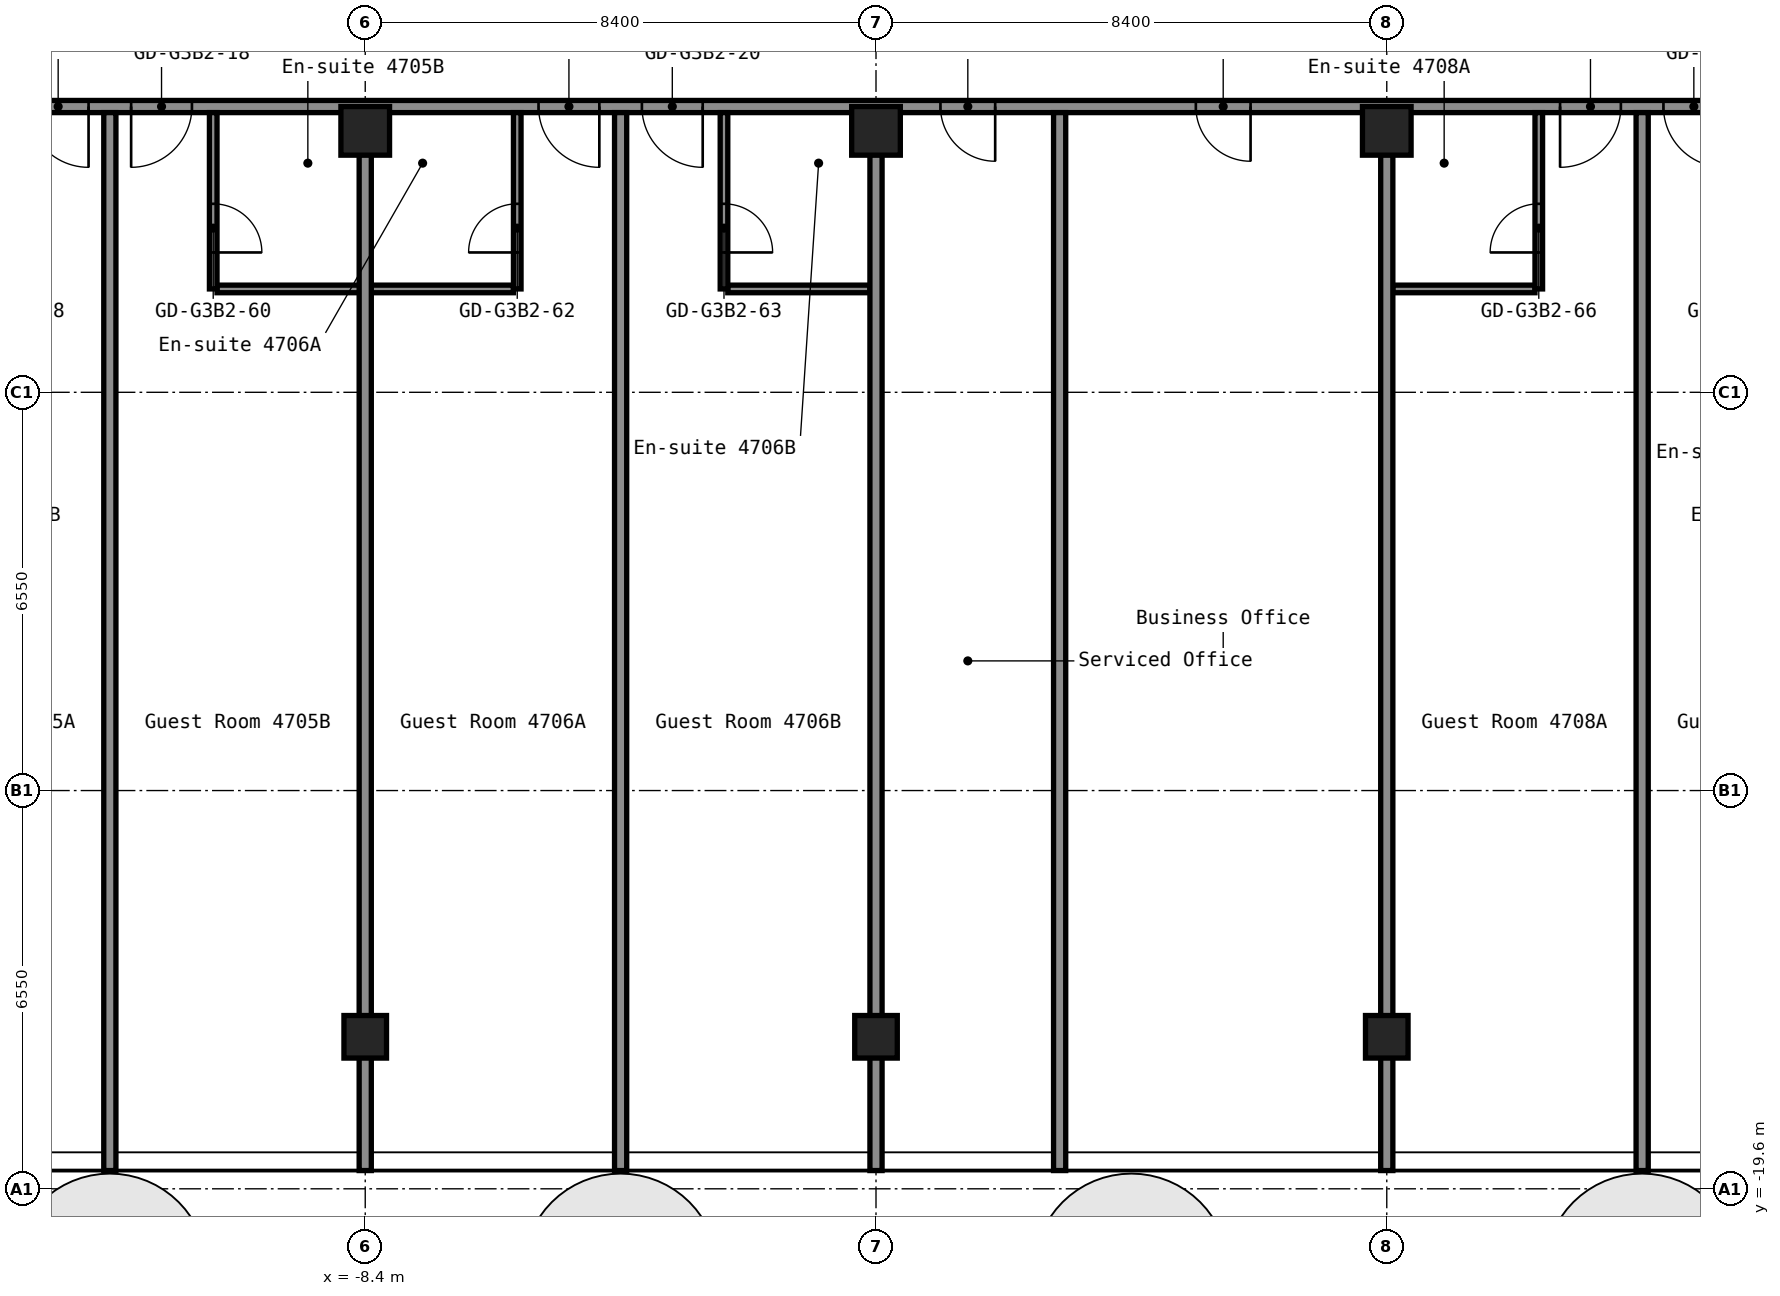
"""IFC4 building model, lengths in metres.
Left out: names, types, materials, properties, quantities, classifications, styles, units other than length and angle.
Written with IfcOpenShell. Run it as: python <this file> out.ifc"""

import sys

from ifc_helpers import new_model, si_unit, direction, frame, frame_2d, origin, origin_2d, place, context, subcontext, project, spatial, rectangle, hollow_rectangle, extrude, element, fill, save


model = new_model("IFC4")
c1 = context("Model", 3, precision=1e-05, world=origin(), true_north=direction((0.0, 1.0)))
c2 = subcontext(c1, "Body", "Model", "MODEL_VIEW")
j1 = project(units=[si_unit("LENGTHUNIT", "METRE"), si_unit("PLANEANGLEUNIT", "RADIAN")], contexts=[c1])
p1 = place(None, origin())
s1 = spatial("IfcSite", under=j1, at=p1, CompositionType="ELEMENT")
p2 = place(p1, origin())
s2 = spatial("IfcBuilding", under=s1, at=p2, CompositionType="ELEMENT")
p3 = place(p2, frame((0.0, 0.0, 166.2)))
s3 = spatial("IfcBuildingStorey", under=s2, at=p3, CompositionType="ELEMENT", Elevation=166.2)
p4 = place(p3, frame((-8.4, -17.1, 0.0), z_axis=(0.0, 0.0, 1.0), x_axis=(1.0, 0.0, 0.0)))
e1 = element("IfcColumn", 1, at=p4, inside=s3, PredefinedType="COLUMN", context=c2, shape_type="SweptSolid", body=[
    extrude(hollow_rectangle(XDim=0.7, YDim=0.7, WallThickness=0.028, at=origin_2d()), origin(), (0.0, 0.0, 1.0), 2.75),
])
p5 = place(p3, frame((-8.4, -2.2, 0.0), z_axis=(0.0, 0.0, 1.0), x_axis=(1.0, 0.0, 0.0)))
e2 = element("IfcColumn", 2, at=p5, inside=s3, PredefinedType="COLUMN", context=c2, shape_type="SweptSolid", body=[
    extrude(hollow_rectangle(XDim=0.8, YDim=0.8, WallThickness=0.032, at=origin_2d()), origin(), (0.0, 0.0, 1.0), 2.75),
])
p6 = place(p3, frame((0.0, -17.1, 0.0), z_axis=(0.0, 0.0, 1.0), x_axis=(1.0, 0.0, 0.0)))
e3 = element("IfcColumn", 3, at=p6, inside=s3, PredefinedType="COLUMN", context=c2, shape_type="SweptSolid", body=[
    extrude(hollow_rectangle(XDim=0.7, YDim=0.7, WallThickness=0.028, at=origin_2d()), origin(), (0.0, 0.0, 1.0), 2.75),
])
p7 = place(p3, frame((0.0, -2.2, 0.0), z_axis=(0.0, 0.0, 1.0), x_axis=(1.0, 0.0, 0.0)))
e4 = element("IfcColumn", 4, at=p7, inside=s3, PredefinedType="COLUMN", context=c2, shape_type="SweptSolid", body=[
    extrude(hollow_rectangle(XDim=0.8, YDim=0.8, WallThickness=0.032, at=origin_2d()), origin(), (0.0, 0.0, 1.0), 2.75),
])
p8 = place(p3, frame((8.4, -17.1, 0.0), z_axis=(0.0, 0.0, 1.0), x_axis=(1.0, 0.0, 0.0)))
e5 = element("IfcColumn", 5, at=p8, inside=s3, PredefinedType="COLUMN", context=c2, shape_type="SweptSolid", body=[
    extrude(hollow_rectangle(XDim=0.7, YDim=0.7, WallThickness=0.028, at=origin_2d()), origin(), (0.0, 0.0, 1.0), 2.75),
])
p9 = place(p3, frame((8.4, -2.2, 0.0), z_axis=(0.0, 0.0, 1.0), x_axis=(1.0, 0.0, 0.0)))
e6 = element("IfcColumn", 6, at=p9, inside=s3, PredefinedType="COLUMN", context=c2, shape_type="SweptSolid", body=[
    extrude(hollow_rectangle(XDim=0.8, YDim=0.8, WallThickness=0.032, at=origin_2d()), origin(), (0.0, 0.0, 1.0), 2.75),
])
p10 = place(p3, frame((-10.837, -4.8, 0.0), z_axis=(0.0, 0.0, 1.0), x_axis=(1.0, 0.0, 0.0)))
e7 = element("IfcWall", 7, at=p10, inside=s3, PredefinedType="PARTITIONING", context=c2, shape_type="SweptSolid", body=[
    extrude(rectangle(XDim=4.875, YDim=0.125, at=frame_2d((2.438, 0.0))), origin(), (0.0, 0.0, 1.0), 2.75),
])
for number, where, z_axis, x_axis in (
    (8, (-2.438, -4.8, 0.0), (0.0, 0.0, 1.0), (1.0, 0.0, 0.0)),
    (9, (8.5, -4.8, 0.0), (0.0, 0.0, 1.0), (1.0, 0.0, 0.0)),
):
    element("IfcWall", number, at=place(p3, frame(where, z_axis=z_axis, x_axis=x_axis)), inside=s3, PredefinedType="PARTITIONING", context=c2, shape_type="SweptSolid", body=[
        extrude(rectangle(XDim=2.337, YDim=0.125, at=frame_2d((1.169, 0.0))), origin(), (0.0, 0.0, 1.0), 2.75),
    ])
p11 = place(p3, frame((-16.8, -1.8, 0.0), z_axis=(0.0, 0.0, 1.0), x_axis=(1.0, 0.0, 0.0)))
e10 = element("IfcWall", 10, at=p11, inside=s3, PredefinedType="PARTITIONING", context=c2, shape_type="SweptSolid", body=[
    extrude(rectangle(XDim=33.6, YDim=0.2, at=frame_2d((16.8, 0.0))), origin(), (0.0, 0.0, 1.0), 2.75),
])
p12 = place(p11, frame((2.85, 0.0, 0.0)))
e11 = element("IfcOpeningElement", 11, at=p12, cuts=e10, PredefinedType="OPENING", context=c2, shape_type="SweptSolid", body=[
    extrude(rectangle(XDim=1.0, YDim=2.1, at=frame_2d((0.5, 1.05))), frame((0.0, 0.11, 0.0), z_axis=(0.0, -1.0, 0.0), x_axis=(1.0, 0.0, 0.0)), (0.0, 0.0, 1.0), 0.22),
])
p13 = place(p11, frame((4.55, 0.0, 0.0)))
e12 = element("IfcOpeningElement", 12, at=p13, cuts=e10, PredefinedType="OPENING", context=c2, shape_type="SweptSolid", body=[
    extrude(rectangle(XDim=1.0, YDim=2.1, at=frame_2d((0.5, 1.05))), frame((0.0, 0.11, 0.0), z_axis=(0.0, -1.0, 0.0), x_axis=(1.0, 0.0, 0.0)), (0.0, 0.0, 1.0), 0.22),
])
p14 = place(p11, frame((11.25, 0.0, 0.0)))
e13 = element("IfcOpeningElement", 13, at=p14, cuts=e10, PredefinedType="OPENING", context=c2, shape_type="SweptSolid", body=[
    extrude(rectangle(XDim=1.0, YDim=2.1, at=frame_2d((0.5, 1.05))), frame((0.0, 0.11, 0.0), z_axis=(0.0, -1.0, 0.0), x_axis=(1.0, 0.0, 0.0)), (0.0, 0.0, 1.0), 0.22),
])
p15 = place(p11, frame((12.95, 0.0, 0.0)))
e14 = element("IfcOpeningElement", 14, at=p15, cuts=e10, PredefinedType="OPENING", context=c2, shape_type="SweptSolid", body=[
    extrude(rectangle(XDim=1.0, YDim=2.1, at=frame_2d((0.5, 1.05))), frame((0.0, 0.11, 0.0), z_axis=(0.0, -1.0, 0.0), x_axis=(1.0, 0.0, 0.0)), (0.0, 0.0, 1.0), 0.22),
])
p16 = place(p11, frame((17.86, 0.0, 0.0)))
e15 = element("IfcOpeningElement", 15, at=p16, cuts=e10, PredefinedType="OPENING", context=c2, shape_type="SweptSolid", body=[
    extrude(rectangle(XDim=0.9, YDim=2.1, at=frame_2d((0.45, 1.05))), frame((0.0, 0.11, 0.0), z_axis=(0.0, -1.0, 0.0), x_axis=(1.0, 0.0, 0.0)), (0.0, 0.0, 1.0), 0.22),
])
p17 = place(p11, frame((22.06, 0.0, 0.0)))
e16 = element("IfcOpeningElement", 16, at=p17, cuts=e10, PredefinedType="OPENING", context=c2, shape_type="SweptSolid", body=[
    extrude(rectangle(XDim=0.9, YDim=2.1, at=frame_2d((0.45, 1.05))), frame((0.0, 0.11, 0.0), z_axis=(0.0, -1.0, 0.0), x_axis=(1.0, 0.0, 0.0)), (0.0, 0.0, 1.0), 0.22),
])
p18 = place(p11, frame((28.05, 0.0, 0.0)))
e17 = element("IfcOpeningElement", 17, at=p18, cuts=e10, PredefinedType="OPENING", context=c2, shape_type="SweptSolid", body=[
    extrude(rectangle(XDim=1.0, YDim=2.1, at=frame_2d((0.5, 1.05))), frame((0.0, 0.11, 0.0), z_axis=(0.0, -1.0, 0.0), x_axis=(1.0, 0.0, 0.0)), (0.0, 0.0, 1.0), 0.22),
])
p19 = place(p11, frame((29.75, 0.0, 0.0)))
e18 = element("IfcOpeningElement", 18, at=p19, cuts=e10, PredefinedType="OPENING", context=c2, shape_type="SweptSolid", body=[
    extrude(rectangle(XDim=1.0, YDim=2.1, at=frame_2d((0.5, 1.05))), frame((0.0, 0.11, 0.0), z_axis=(0.0, -1.0, 0.0), x_axis=(1.0, 0.0, 0.0)), (0.0, 0.0, 1.0), 0.22),
])
p20 = place(p3, frame((-12.6, -19.3, 0.0), z_axis=(0.0, 0.0, 1.0), x_axis=(0.0, 1.0, 0.0)))
e19 = element("IfcWall", 19, at=p20, inside=s3, PredefinedType="PARTITIONING", context=c2, shape_type="SweptSolid", body=[
    extrude(rectangle(XDim=17.4, YDim=0.2, at=frame_2d((8.7, 0.0))), origin(), (0.0, 0.0, 1.0), 2.75),
])
p21 = place(p3, frame((-10.9, -4.8, 0.0), z_axis=(0.0, 0.0, 1.0), x_axis=(0.0, 1.0, 0.0)))
e20 = element("IfcWall", 20, at=p21, inside=s3, PredefinedType="PARTITIONING", context=c2, shape_type="SweptSolid", body=[
    extrude(rectangle(XDim=2.9, YDim=0.125, at=frame_2d((1.45, 0.0))), origin(), (0.0, 0.0, 1.0), 2.75),
])
p22 = place(p21, frame((0.6, 0.0, 0.0)))
e21 = element("IfcOpeningElement", 21, at=p22, cuts=e20, PredefinedType="OPENING", context=c2, shape_type="SweptSolid", body=[
    extrude(rectangle(XDim=0.8, YDim=2.1, at=frame_2d((0.4, 1.05))), frame((0.0, 0.073, 0.0), z_axis=(0.0, -1.0, 0.0), x_axis=(1.0, 0.0, 0.0)), (0.0, 0.0, 1.0), 0.145),
])
p23 = place(p3, frame((-8.4, -19.3, 0.0), z_axis=(0.0, 0.0, 1.0), x_axis=(0.0, 1.0, 0.0)))
e22 = element("IfcWall", 22, at=p23, inside=s3, PredefinedType="PARTITIONING", context=c2, shape_type="SweptSolid", body=[
    extrude(rectangle(XDim=16.71, YDim=0.2, at=frame_2d((8.355, 0.0))), origin(), (0.0, 0.0, 1.0), 2.75),
])
p24 = place(p3, frame((-5.9, -4.8, 0.0), z_axis=(0.0, 0.0, 1.0), x_axis=(0.0, 1.0, 0.0)))
e23 = element("IfcWall", 23, at=p24, inside=s3, PredefinedType="PARTITIONING", context=c2, shape_type="SweptSolid", body=[
    extrude(rectangle(XDim=2.9, YDim=0.125, at=frame_2d((1.45, 0.0))), origin(), (0.0, 0.0, 1.0), 2.75),
])
p25 = place(p24, frame((0.6, 0.0, 0.0)))
e24 = element("IfcOpeningElement", 24, at=p25, cuts=e23, PredefinedType="OPENING", context=c2, shape_type="SweptSolid", body=[
    extrude(rectangle(XDim=0.8, YDim=2.1, at=frame_2d((0.4, 1.05))), frame((0.0, 0.073, 0.0), z_axis=(0.0, -1.0, 0.0), x_axis=(1.0, 0.0, 0.0)), (0.0, 0.0, 1.0), 0.145),
])
p26 = place(p3, frame((-4.2, -19.3, 0.0), z_axis=(0.0, 0.0, 1.0), x_axis=(0.0, 1.0, 0.0)))
e25 = element("IfcWall", 25, at=p26, inside=s3, PredefinedType="PARTITIONING", context=c2, shape_type="SweptSolid", body=[
    extrude(rectangle(XDim=17.4, YDim=0.2, at=frame_2d((8.7, 0.0))), origin(), (0.0, 0.0, 1.0), 2.75),
])
p27 = place(p3, frame((-2.5, -4.8, 0.0), z_axis=(0.0, 0.0, 1.0), x_axis=(0.0, 1.0, 0.0)))
e26 = element("IfcWall", 26, at=p27, inside=s3, PredefinedType="PARTITIONING", context=c2, shape_type="SweptSolid", body=[
    extrude(rectangle(XDim=2.9, YDim=0.125, at=frame_2d((1.45, 0.0))), origin(), (0.0, 0.0, 1.0), 2.75),
])
p28 = place(p27, frame((0.6, 0.0, 0.0)))
e27 = element("IfcOpeningElement", 27, at=p28, cuts=e26, PredefinedType="OPENING", context=c2, shape_type="SweptSolid", body=[
    extrude(rectangle(XDim=0.8, YDim=2.1, at=frame_2d((0.4, 1.05))), frame((0.0, 0.073, 0.0), z_axis=(0.0, -1.0, 0.0), x_axis=(1.0, 0.0, 0.0)), (0.0, 0.0, 1.0), 0.145),
])
p29 = place(p3, frame((0.0, -19.3, 0.0), z_axis=(0.0, 0.0, 1.0), x_axis=(0.0, 1.0, 0.0)))
e28 = element("IfcWall", 28, at=p29, inside=s3, PredefinedType="PARTITIONING", context=c2, shape_type="SweptSolid", body=[
    extrude(rectangle(XDim=16.71, YDim=0.2, at=frame_2d((8.355, 0.0))), origin(), (0.0, 0.0, 1.0), 2.75),
])
p30 = place(p3, frame((3.02, -19.3, 0.0), z_axis=(0.0, 0.0, 1.0), x_axis=(0.0, 1.0, 0.0)))
e29 = element("IfcWall", 29, at=p30, inside=s3, PredefinedType="PARTITIONING", context=c2, shape_type="SweptSolid", body=[
    extrude(rectangle(XDim=17.4, YDim=0.2, at=frame_2d((8.7, 0.0))), origin(), (0.0, 0.0, 1.0), 2.75),
])
p31 = place(p3, frame((8.4, -19.3, 0.0), z_axis=(0.0, 0.0, 1.0), x_axis=(0.0, 1.0, 0.0)))
e30 = element("IfcWall", 30, at=p31, inside=s3, PredefinedType="PARTITIONING", context=c2, shape_type="SweptSolid", body=[
    extrude(rectangle(XDim=16.71, YDim=0.2, at=frame_2d((8.355, 0.0))), origin(), (0.0, 0.0, 1.0), 2.75),
])
p32 = place(p3, frame((10.9, -4.8, 0.0), z_axis=(0.0, 0.0, 1.0), x_axis=(0.0, 1.0, 0.0)))
e31 = element("IfcWall", 31, at=p32, inside=s3, PredefinedType="PARTITIONING", context=c2, shape_type="SweptSolid", body=[
    extrude(rectangle(XDim=2.9, YDim=0.125, at=frame_2d((1.45, 0.0))), origin(), (0.0, 0.0, 1.0), 2.75),
])
p33 = place(p32, frame((0.6, 0.0, 0.0)))
e32 = element("IfcOpeningElement", 32, at=p33, cuts=e31, PredefinedType="OPENING", context=c2, shape_type="SweptSolid", body=[
    extrude(rectangle(XDim=0.8, YDim=2.1, at=frame_2d((0.4, 1.05))), frame((0.0, 0.073, 0.0), z_axis=(0.0, -1.0, 0.0), x_axis=(1.0, 0.0, 0.0)), (0.0, 0.0, 1.0), 0.145),
])
p34 = place(p3, frame((12.6, -19.3, 0.0), z_axis=(0.0, 0.0, 1.0), x_axis=(0.0, 1.0, 0.0)))
e33 = element("IfcWall", 33, at=p34, inside=s3, PredefinedType="PARTITIONING", context=c2, shape_type="SweptSolid", body=[
    extrude(rectangle(XDim=17.4, YDim=0.2, at=frame_2d((8.7, 0.0))), origin(), (0.0, 0.0, 1.0), 2.75),
])
p35 = place(p12, origin())
e34 = element("IfcDoor", 34, at=p35, inside=s3, OperationType="SINGLE_SWING_RIGHT", PredefinedType="DOOR", context=c2, shape_type="SweptSolid", body=[
    extrude(rectangle(XDim=1.0, YDim=2.1, at=frame_2d((0.5, 1.05))), frame((0.0, 0.025, 0.0), z_axis=(0.0, -1.0, 0.0), x_axis=(1.0, 0.0, 0.0)), (0.0, 0.0, 1.0), 0.05),
])
fill(e11, e34)
p36 = place(p13, origin())
e35 = element("IfcDoor", 35, at=p36, inside=s3, OperationType="SINGLE_SWING_LEFT", PredefinedType="DOOR", context=c2, shape_type="SweptSolid", body=[
    extrude(rectangle(XDim=1.0, YDim=2.1, at=frame_2d((0.5, 1.05))), frame((0.0, 0.025, 0.0), z_axis=(0.0, -1.0, 0.0), x_axis=(1.0, 0.0, 0.0)), (0.0, 0.0, 1.0), 0.05),
])
fill(e12, e35)
p37 = place(p14, origin())
e36 = element("IfcDoor", 36, at=p37, inside=s3, OperationType="SINGLE_SWING_RIGHT", PredefinedType="DOOR", context=c2, shape_type="SweptSolid", body=[
    extrude(rectangle(XDim=1.0, YDim=2.1, at=frame_2d((0.5, 1.05))), frame((0.0, 0.025, 0.0), z_axis=(0.0, -1.0, 0.0), x_axis=(1.0, 0.0, 0.0)), (0.0, 0.0, 1.0), 0.05),
])
fill(e13, e36)
p38 = place(p15, origin())
e37 = element("IfcDoor", 37, at=p38, inside=s3, OperationType="SINGLE_SWING_RIGHT", PredefinedType="DOOR", context=c2, shape_type="SweptSolid", body=[
    extrude(rectangle(XDim=1.0, YDim=2.1, at=frame_2d((0.5, 1.05))), frame((0.0, 0.025, 0.0), z_axis=(0.0, -1.0, 0.0), x_axis=(1.0, 0.0, 0.0)), (0.0, 0.0, 1.0), 0.05),
])
fill(e14, e37)
p39 = place(p16, origin())
e38 = element("IfcDoor", 38, at=p39, inside=s3, OperationType="SINGLE_SWING_RIGHT", PredefinedType="DOOR", context=c2, shape_type="SweptSolid", body=[
    extrude(rectangle(XDim=0.9, YDim=2.1, at=frame_2d((0.45, 1.05))), frame((0.0, 0.025, 0.0), z_axis=(0.0, -1.0, 0.0), x_axis=(1.0, 0.0, 0.0)), (0.0, 0.0, 1.0), 0.05),
])
fill(e15, e38)
p40 = place(p17, origin())
e39 = element("IfcDoor", 39, at=p40, inside=s3, OperationType="SINGLE_SWING_RIGHT", PredefinedType="DOOR", context=c2, shape_type="SweptSolid", body=[
    extrude(rectangle(XDim=0.9, YDim=2.1, at=frame_2d((0.45, 1.05))), frame((0.0, 0.025, 0.0), z_axis=(0.0, -1.0, 0.0), x_axis=(1.0, 0.0, 0.0)), (0.0, 0.0, 1.0), 0.05),
])
fill(e16, e39)
p41 = place(p18, origin())
e40 = element("IfcDoor", 40, at=p41, inside=s3, OperationType="SINGLE_SWING_LEFT", PredefinedType="DOOR", context=c2, shape_type="SweptSolid", body=[
    extrude(rectangle(XDim=1.0, YDim=2.1, at=frame_2d((0.5, 1.05))), frame((0.0, 0.025, 0.0), z_axis=(0.0, -1.0, 0.0), x_axis=(1.0, 0.0, 0.0)), (0.0, 0.0, 1.0), 0.05),
])
fill(e17, e40)
p42 = place(p19, origin())
e41 = element("IfcDoor", 41, at=p42, inside=s3, OperationType="SINGLE_SWING_RIGHT", PredefinedType="DOOR", context=c2, shape_type="SweptSolid", body=[
    extrude(rectangle(XDim=1.0, YDim=2.1, at=frame_2d((0.5, 1.05))), frame((0.0, 0.025, 0.0), z_axis=(0.0, -1.0, 0.0), x_axis=(1.0, 0.0, 0.0)), (0.0, 0.0, 1.0), 0.05),
])
fill(e18, e41)
p43 = place(p22, origin())
e42 = element("IfcDoor", 42, at=p43, inside=s3, OperationType="SINGLE_SWING_LEFT", PredefinedType="DOOR", context=c2, shape_type="SweptSolid", body=[
    extrude(rectangle(XDim=0.8, YDim=2.1, at=frame_2d((0.4, 1.05))), frame((0.0, 0.025, 0.0), z_axis=(0.0, -1.0, 0.0), x_axis=(1.0, 0.0, 0.0)), (0.0, 0.0, 1.0), 0.05),
])
fill(e21, e42)
p44 = place(p25, origin())
e43 = element("IfcDoor", 43, at=p44, inside=s3, OperationType="SINGLE_SWING_RIGHT", PredefinedType="DOOR", context=c2, shape_type="SweptSolid", body=[
    extrude(rectangle(XDim=0.8, YDim=2.1, at=frame_2d((0.4, 1.05))), frame((0.0, 0.025, 0.0), z_axis=(0.0, -1.0, 0.0), x_axis=(1.0, 0.0, 0.0)), (0.0, 0.0, 1.0), 0.05),
])
fill(e24, e43)
p45 = place(p28, origin())
e44 = element("IfcDoor", 44, at=p45, inside=s3, OperationType="SINGLE_SWING_LEFT", PredefinedType="DOOR", context=c2, shape_type="SweptSolid", body=[
    extrude(rectangle(XDim=0.8, YDim=2.1, at=frame_2d((0.4, 1.05))), frame((0.0, 0.025, 0.0), z_axis=(0.0, -1.0, 0.0), x_axis=(1.0, 0.0, 0.0)), (0.0, 0.0, 1.0), 0.05),
])
fill(e27, e44)
p46 = place(p33, origin())
e45 = element("IfcDoor", 45, at=p46, inside=s3, OperationType="SINGLE_SWING_RIGHT", PredefinedType="DOOR", context=c2, shape_type="SweptSolid", body=[
    extrude(rectangle(XDim=0.8, YDim=2.1, at=frame_2d((0.4, 1.05))), frame((0.0, 0.025, 0.0), z_axis=(0.0, -1.0, 0.0), x_axis=(1.0, 0.0, 0.0)), (0.0, 0.0, 1.0), 0.05),
])
fill(e32, e45)
save(model, sys.argv[1])
